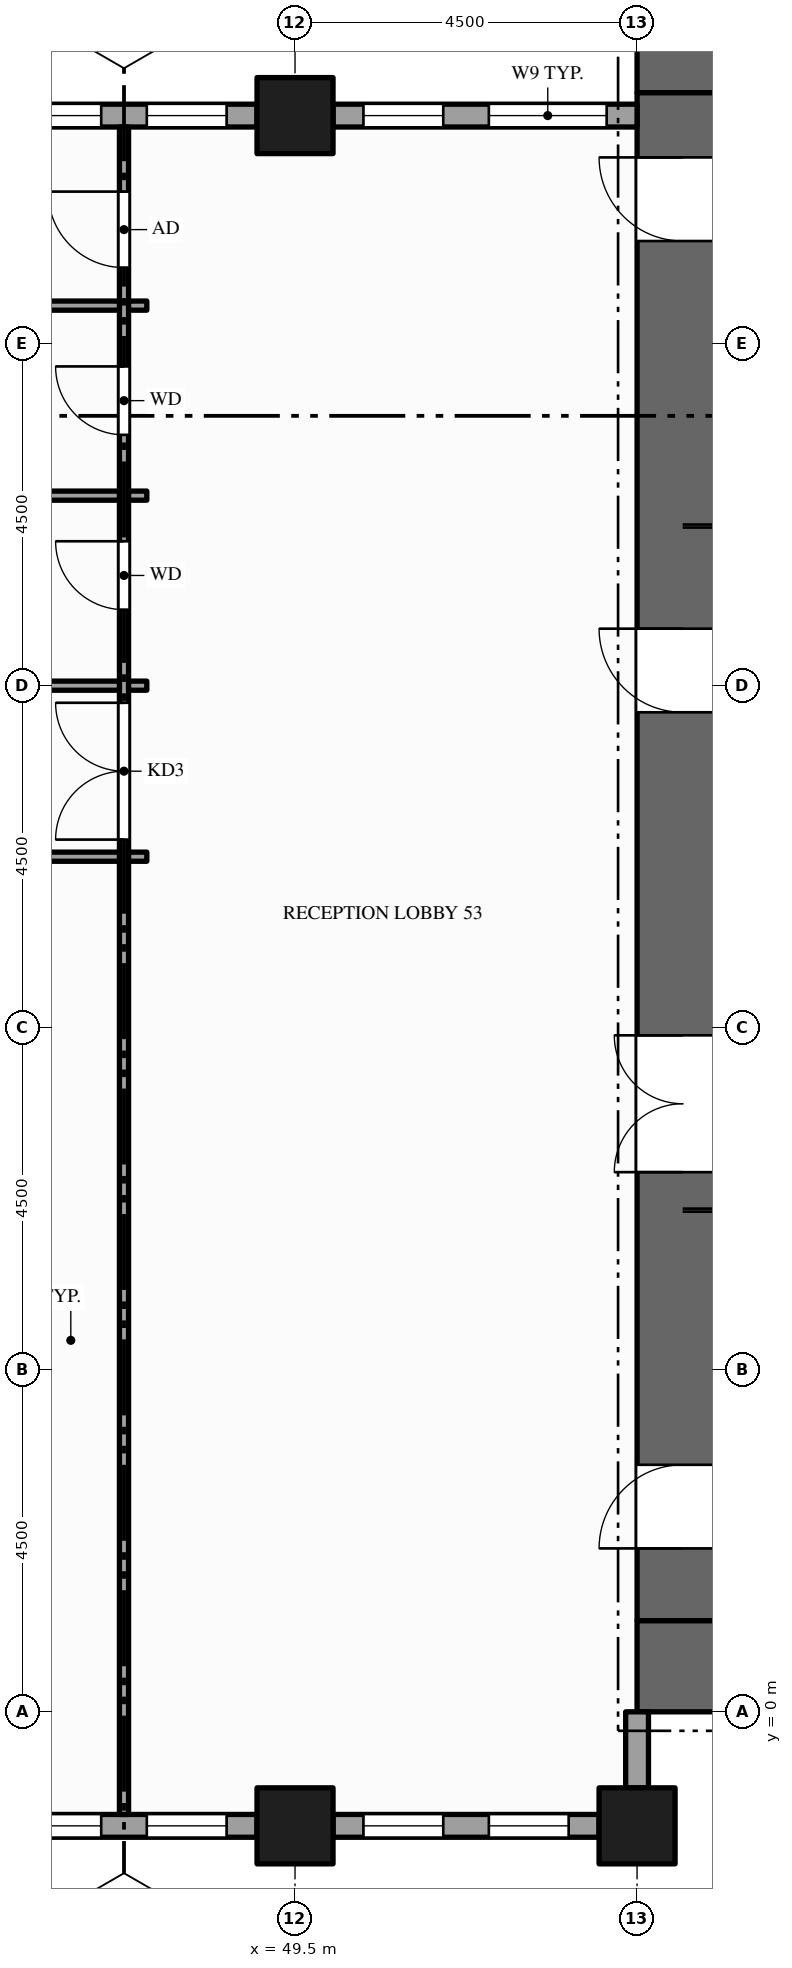
"""IFC4 building model, lengths in metres.
Left out: names, types, materials, properties, quantities, classifications, styles, units other than length and angle.
Written with IfcOpenShell. Run it as: python <this file> out.ifc"""

import sys

from ifc_helpers import new_model, si_unit, direction, frame, frame_2d, origin, origin_2d, place, context, subcontext, project, spatial, rectangle, hollow_rectangle, extrude, element, fill, save


model = new_model("IFC4")
c1 = context("Model", 3, precision=1e-05, world=origin(), true_north=direction((0.0, 1.0)))
c2 = subcontext(c1, "Body", "Model", "MODEL_VIEW")
j1 = project(units=[si_unit("LENGTHUNIT", "METRE"), si_unit("PLANEANGLEUNIT", "RADIAN")], contexts=[c1])
p1 = place(None, origin())
s1 = spatial("IfcSite", under=j1, at=p1, CompositionType="ELEMENT")
p2 = place(p1, origin())
s2 = spatial("IfcBuilding", under=s1, at=p2, CompositionType="ELEMENT")
p3 = place(p2, frame((0.0, 0.0, 123.0)))
s3 = spatial("IfcBuildingStorey", under=s2, at=p3, CompositionType="ELEMENT", Elevation=123.0)
for number, where, z_axis, x_axis in (
    (1, (67.5, 0.6, -0.15), (0.0, 0.0, 1.0), (-1.0, 0.0, 0.0)),
    (2, (54.0, 21.9, -0.15), (0.0, 0.0, 1.0), (1.0, 0.0, 0.0)),
):
    element("IfcWall", number, at=place(p3, frame(where, z_axis=z_axis, x_axis=x_axis)), inside=s3, PredefinedType="SHEAR", context=c2, shape_type="SweptSolid", body=[
        extrude(rectangle(XDim=13.5, YDim=1.2, at=frame_2d((6.75, 0.0))), origin(), (0.0, 0.0, 1.0), 4.0),
    ])
p4 = place(p3, frame((54.6, 1.2, -0.15), z_axis=(0.0, 0.0, 1.0), x_axis=(0.0, 1.0, 0.0)))
e3 = element("IfcWall", 3, at=p4, inside=s3, PredefinedType="SHEAR", context=c2, shape_type="SweptSolid", body=[
    extrude(rectangle(XDim=20.1, YDim=1.2, at=frame_2d((10.05, 0.0))), origin(), (0.0, 0.0, 1.0), 4.0),
])
p5 = place(p4, frame((5.9, 0.0, 0.15)))
e4 = element("IfcOpeningElement", 4, at=p5, cuts=e3, PredefinedType="OPENING", context=c2, shape_type="SweptSolid", body=[
    extrude(rectangle(XDim=1.8, YDim=2.1, at=frame_2d((0.9, 1.05))), frame((0.0, 0.61, 0.0), z_axis=(0.0, -1.0, 0.0), x_axis=(1.0, 0.0, 0.0)), (0.0, 0.0, 1.0), 1.22),
])
p6 = place(p4, frame((11.95, 0.0, 0.15)))
e5 = element("IfcOpeningElement", 5, at=p6, cuts=e3, PredefinedType="OPENING", context=c2, shape_type="SweptSolid", body=[
    extrude(rectangle(XDim=1.1, YDim=2.1, at=frame_2d((0.55, 1.05))), frame((0.0, 0.61, 0.0), z_axis=(0.0, -1.0, 0.0), x_axis=(1.0, 0.0, 0.0)), (0.0, 0.0, 1.0), 1.22),
])
p7 = place(p4, frame((0.95, 0.0, 0.15)))
e6 = element("IfcOpeningElement", 6, at=p7, cuts=e3, PredefinedType="OPENING", context=c2, shape_type="SweptSolid", body=[
    extrude(rectangle(XDim=1.1, YDim=2.1, at=frame_2d((0.55, 1.05))), frame((0.0, 0.61, 0.0), z_axis=(0.0, -1.0, 0.0), x_axis=(1.0, 0.0, 0.0)), (0.0, 0.0, 1.0), 1.22),
])
p8 = place(p4, frame((18.15, 0.0, 0.15)))
e7 = element("IfcOpeningElement", 7, at=p8, cuts=e3, PredefinedType="OPENING", context=c2, shape_type="SweptSolid", body=[
    extrude(rectangle(XDim=1.1, YDim=2.1, at=frame_2d((0.55, 1.05))), frame((0.0, 0.61, 0.0), z_axis=(0.0, -1.0, 0.0), x_axis=(1.0, 0.0, 0.0)), (0.0, 0.0, 1.0), 1.22),
])
for number, where, z_axis, x_axis in (
    (8, (49.5, -1.5, -0.15), (0.0, 0.0, 1.0), (1.0, 0.0, 0.0)),
    (9, (49.5, 21.0, -0.15), (0.0, 0.0, 1.0), (1.0, 0.0, 0.0)),
    (10, (54.0, -1.5, -0.15), (0.0, 0.0, 1.0), (1.0, 0.0, 0.0)),
):
    element("IfcColumn", number, at=place(p3, frame(where, z_axis=z_axis, x_axis=x_axis)), inside=s3, PredefinedType="COLUMN", context=c2, shape_type="SweptSolid", body=[
        extrude(hollow_rectangle(XDim=1.0, YDim=1.0, WallThickness=0.05, at=origin_2d()), origin(), (0.0, 0.0, 1.0), 4.0),
    ])
p9 = place(p3, frame((45.5, -1.5, 0.0), z_axis=(0.0, 0.0, 1.0), x_axis=(1.0, 0.0, 0.0)))
e11 = element("IfcWall", 11, at=p9, inside=s3, PredefinedType="STANDARD", context=c2, shape_type="SweptSolid", body=[
    extrude(rectangle(XDim=3.5, YDim=0.3, at=frame_2d((1.75, 0.0))), origin(), (0.0, 0.0, 1.0), 3.154),
])
p10 = place(p9, frame((0.4, 0.0, 0.9)))
e12 = element("IfcOpeningElement", 12, at=p10, cuts=e11, PredefinedType="OPENING", context=c2, shape_type="SweptSolid", body=[
    extrude(rectangle(XDim=1.05, YDim=2.0, at=frame_2d((0.525, 1.0))), frame((0.0, 0.16, 0.0), z_axis=(0.0, -1.0, 0.0), x_axis=(1.0, 0.0, 0.0)), (0.0, 0.0, 1.0), 0.32),
])
p11 = place(p9, frame((2.05, 0.0, 0.9)))
e13 = element("IfcOpeningElement", 13, at=p11, cuts=e11, PredefinedType="OPENING", context=c2, shape_type="SweptSolid", body=[
    extrude(rectangle(XDim=1.05, YDim=2.0, at=frame_2d((0.525, 1.0))), frame((0.0, 0.16, 0.0), z_axis=(0.0, -1.0, 0.0), x_axis=(1.0, 0.0, 0.0)), (0.0, 0.0, 1.0), 0.32),
])
p12 = place(p3, frame((50.0, -1.5, 0.0), z_axis=(0.0, 0.0, 1.0), x_axis=(1.0, 0.0, 0.0)))
e14 = element("IfcWall", 14, at=p12, inside=s3, PredefinedType="STANDARD", context=c2, shape_type="SweptSolid", body=[
    extrude(rectangle(XDim=3.5, YDim=0.3, at=frame_2d((1.75, 0.0))), origin(), (0.0, 0.0, 1.0), 3.154),
])
p13 = place(p12, frame((0.4, 0.0, 0.9)))
e15 = element("IfcOpeningElement", 15, at=p13, cuts=e14, PredefinedType="OPENING", context=c2, shape_type="SweptSolid", body=[
    extrude(rectangle(XDim=1.05, YDim=2.0, at=frame_2d((0.525, 1.0))), frame((0.0, 0.16, 0.0), z_axis=(0.0, -1.0, 0.0), x_axis=(1.0, 0.0, 0.0)), (0.0, 0.0, 1.0), 0.32),
])
p14 = place(p12, frame((2.05, 0.0, 0.9)))
e16 = element("IfcOpeningElement", 16, at=p14, cuts=e14, PredefinedType="OPENING", context=c2, shape_type="SweptSolid", body=[
    extrude(rectangle(XDim=1.05, YDim=2.0, at=frame_2d((0.525, 1.0))), frame((0.0, 0.16, 0.0), z_axis=(0.0, -1.0, 0.0), x_axis=(1.0, 0.0, 0.0)), (0.0, 0.0, 1.0), 0.32),
])
p15 = place(p3, frame((54.0, -1.0, 0.0), z_axis=(0.0, 0.0, 1.0), x_axis=(0.0, 1.0, 0.0)))
e17 = element("IfcWall", 17, at=p15, inside=s3, PredefinedType="STANDARD", context=c2, shape_type="SweptSolid", body=[
    extrude(rectangle(XDim=1.0, YDim=0.3, at=frame_2d((0.5, 0.0))), origin(), (0.0, 0.0, 1.0), 3.154),
])
p16 = place(p3, frame((54.0, 21.0, 0.0), z_axis=(0.0, 0.0, 1.0), x_axis=(-1.0, 0.0, 0.0)))
e18 = element("IfcWall", 18, at=p16, inside=s3, PredefinedType="STANDARD", context=c2, shape_type="SweptSolid", body=[
    extrude(rectangle(XDim=4.0, YDim=0.3, at=frame_2d((2.0, 0.0))), origin(), (0.0, 0.0, 1.0), 3.154),
])
p17 = place(p16, frame((0.4, 0.0, 0.9)))
e19 = element("IfcOpeningElement", 19, at=p17, cuts=e18, PredefinedType="OPENING", context=c2, shape_type="SweptSolid", body=[
    extrude(rectangle(XDim=1.55, YDim=2.0, at=frame_2d((0.775, 1.0))), frame((0.0, 0.16, 0.0), z_axis=(0.0, -1.0, 0.0), x_axis=(1.0, 0.0, 0.0)), (0.0, 0.0, 1.0), 0.32),
])
p18 = place(p16, frame((2.55, 0.0, 0.9)))
e20 = element("IfcOpeningElement", 20, at=p18, cuts=e18, PredefinedType="OPENING", context=c2, shape_type="SweptSolid", body=[
    extrude(rectangle(XDim=1.05, YDim=2.0, at=frame_2d((0.525, 1.0))), frame((0.0, 0.16, 0.0), z_axis=(0.0, -1.0, 0.0), x_axis=(1.0, 0.0, 0.0)), (0.0, 0.0, 1.0), 0.32),
])
p19 = place(p3, frame((49.0, 21.0, 0.0), z_axis=(0.0, 0.0, 1.0), x_axis=(-1.0, 0.0, 0.0)))
e21 = element("IfcWall", 21, at=p19, inside=s3, PredefinedType="STANDARD", context=c2, shape_type="SweptSolid", body=[
    extrude(rectangle(XDim=3.5, YDim=0.3, at=frame_2d((1.75, 0.0))), origin(), (0.0, 0.0, 1.0), 3.154),
])
p20 = place(p19, frame((0.4, 0.0, 0.9)))
e22 = element("IfcOpeningElement", 22, at=p20, cuts=e21, PredefinedType="OPENING", context=c2, shape_type="SweptSolid", body=[
    extrude(rectangle(XDim=1.05, YDim=2.0, at=frame_2d((0.525, 1.0))), frame((0.0, 0.16, 0.0), z_axis=(0.0, -1.0, 0.0), x_axis=(1.0, 0.0, 0.0)), (0.0, 0.0, 1.0), 0.32),
])
p21 = place(p19, frame((2.05, 0.0, 0.9)))
e23 = element("IfcOpeningElement", 23, at=p21, cuts=e21, PredefinedType="OPENING", context=c2, shape_type="SweptSolid", body=[
    extrude(rectangle(XDim=1.05, YDim=2.0, at=frame_2d((0.525, 1.0))), frame((0.0, 0.16, 0.0), z_axis=(0.0, -1.0, 0.0), x_axis=(1.0, 0.0, 0.0)), (0.0, 0.0, 1.0), 0.32),
])
p22 = place(p3, frame((47.25, -1.35, 0.0), z_axis=(0.0, 0.0, 1.0), x_axis=(0.0, 1.0, 0.0)))
e24 = element("IfcWall", 24, at=p22, inside=s3, PredefinedType="PARTITIONING", context=c2, shape_type="SweptSolid", body=[
    extrude(rectangle(XDim=22.2, YDim=0.12, at=frame_2d((11.1, 0.0))), origin(), (0.0, 0.0, 1.0), 2.938),
])
p23 = place(p22, frame((12.825, 0.0, 0.0)))
e25 = element("IfcOpeningElement", 25, at=p23, cuts=e24, PredefinedType="OPENING", context=c2, shape_type="SweptSolid", body=[
    extrude(rectangle(XDim=1.8, YDim=2.1, at=frame_2d((0.9, 1.05))), frame((0.0, 0.07, 0.0), z_axis=(0.0, -1.0, 0.0), x_axis=(1.0, 0.0, 0.0)), (0.0, 0.0, 1.0), 0.14),
])
p24 = place(p22, frame((15.85, 0.0, 0.0)))
e26 = element("IfcOpeningElement", 26, at=p24, cuts=e24, PredefinedType="OPENING", context=c2, shape_type="SweptSolid", body=[
    extrude(rectangle(XDim=0.9, YDim=2.1, at=frame_2d((0.45, 1.05))), frame((0.0, 0.07, 0.0), z_axis=(0.0, -1.0, 0.0), x_axis=(1.0, 0.0, 0.0)), (0.0, 0.0, 1.0), 0.14),
])
p25 = place(p22, frame((18.15, 0.0, 0.0)))
e27 = element("IfcOpeningElement", 27, at=p25, cuts=e24, PredefinedType="OPENING", context=c2, shape_type="SweptSolid", body=[
    extrude(rectangle(XDim=0.9, YDim=2.1, at=frame_2d((0.45, 1.05))), frame((0.0, 0.07, 0.0), z_axis=(0.0, -1.0, 0.0), x_axis=(1.0, 0.0, 0.0)), (0.0, 0.0, 1.0), 0.14),
])
p26 = place(p22, frame((20.35, 0.0, 0.0)))
e28 = element("IfcOpeningElement", 28, at=p26, cuts=e24, PredefinedType="OPENING", context=c2, shape_type="SweptSolid", body=[
    extrude(rectangle(XDim=1.0, YDim=2.1, at=frame_2d((0.5, 1.05))), frame((0.0, 0.07, 0.0), z_axis=(0.0, -1.0, 0.0), x_axis=(1.0, 0.0, 0.0)), (0.0, 0.0, 1.0), 0.14),
])
p27 = place(p3, frame((42.81, 11.25, 0.0), z_axis=(0.0, 0.0, 1.0), x_axis=(1.0, 0.0, 0.0)))
e29 = element("IfcWall", 29, at=p27, inside=s3, PredefinedType="PARTITIONING", context=c2, shape_type="SweptSolid", body=[
    extrude(rectangle(XDim=4.38, YDim=0.12, at=frame_2d((2.19, 0.0))), origin(), (0.0, 0.0, 1.0), 2.938),
])
p28 = place(p27, frame((1.69, 0.0, 0.0)))
e30 = element("IfcOpeningElement", 30, at=p28, cuts=e29, PredefinedType="OPENING", context=c2, shape_type="SweptSolid", body=[
    extrude(rectangle(XDim=1.0, YDim=2.1, at=frame_2d((0.5, 1.05))), frame((0.0, 0.07, 0.0), z_axis=(0.0, -1.0, 0.0), x_axis=(1.0, 0.0, 0.0)), (0.0, 0.0, 1.0), 0.14),
])
p29 = place(p3, frame((47.31, 11.25, 0.0), z_axis=(0.0, 0.0, 1.0), x_axis=(1.0, 0.0, 0.0)))
e31 = element("IfcWall", 31, at=p29, inside=s3, PredefinedType="PARTITIONING", context=c2, shape_type="SweptSolid", body=[
    extrude(rectangle(XDim=0.24, YDim=0.12, at=frame_2d((0.12, 0.0))), origin(), (0.0, 0.0, 1.0), 2.938),
])
p30 = place(p3, frame((42.81, 13.5, 0.0), z_axis=(0.0, 0.0, 1.0), x_axis=(1.0, 0.0, 0.0)))
e32 = element("IfcWall", 32, at=p30, inside=s3, PredefinedType="PARTITIONING", context=c2, shape_type="SweptSolid", body=[
    extrude(rectangle(XDim=4.38, YDim=0.12, at=frame_2d((2.19, 0.0))), origin(), (0.0, 0.0, 1.0), 2.938),
])
p31 = place(p3, frame((47.31, 13.5, 0.0), z_axis=(0.0, 0.0, 1.0), x_axis=(1.0, 0.0, 0.0)))
e33 = element("IfcWall", 33, at=p31, inside=s3, PredefinedType="PARTITIONING", context=c2, shape_type="SweptSolid", body=[
    extrude(rectangle(XDim=0.24, YDim=0.12, at=frame_2d((0.12, 0.0))), origin(), (0.0, 0.0, 1.0), 2.938),
])
p32 = place(p3, frame((42.81, 16.0, 0.0), z_axis=(0.0, 0.0, 1.0), x_axis=(1.0, 0.0, 0.0)))
e34 = element("IfcWall", 34, at=p32, inside=s3, PredefinedType="PARTITIONING", context=c2, shape_type="SweptSolid", body=[
    extrude(rectangle(XDim=4.38, YDim=0.12, at=frame_2d((2.19, 0.0))), origin(), (0.0, 0.0, 1.0), 2.938),
])
p33 = place(p3, frame((47.31, 16.0, 0.0), z_axis=(0.0, 0.0, 1.0), x_axis=(1.0, 0.0, 0.0)))
e35 = element("IfcWall", 35, at=p33, inside=s3, PredefinedType="PARTITIONING", context=c2, shape_type="SweptSolid", body=[
    extrude(rectangle(XDim=0.24, YDim=0.12, at=frame_2d((0.12, 0.0))), origin(), (0.0, 0.0, 1.0), 2.938),
])
p34 = place(p3, frame((42.81, 18.5, 0.0), z_axis=(0.0, 0.0, 1.0), x_axis=(1.0, 0.0, 0.0)))
e36 = element("IfcWall", 36, at=p34, inside=s3, PredefinedType="PARTITIONING", context=c2, shape_type="SweptSolid", body=[
    extrude(rectangle(XDim=4.38, YDim=0.12, at=frame_2d((2.19, 0.0))), origin(), (0.0, 0.0, 1.0), 2.938),
])
p35 = place(p3, frame((47.31, 18.5, 0.0), z_axis=(0.0, 0.0, 1.0), x_axis=(1.0, 0.0, 0.0)))
e37 = element("IfcWall", 37, at=p35, inside=s3, PredefinedType="PARTITIONING", context=c2, shape_type="SweptSolid", body=[
    extrude(rectangle(XDim=0.24, YDim=0.12, at=frame_2d((0.12, 0.0))), origin(), (0.0, 0.0, 1.0), 2.938),
])
p36 = place(p10, origin())
e38 = element("IfcWindow", 38, at=p36, inside=s3, PartitioningType="SINGLE_PANEL", PredefinedType="WINDOW", context=c2, shape_type="SweptSolid", body=[
    extrude(rectangle(XDim=1.05, YDim=2.0, at=frame_2d((0.525, 1.0))), frame((0.0, 0.03, 0.0), z_axis=(0.0, -1.0, 0.0), x_axis=(1.0, 0.0, 0.0)), (0.0, 0.0, 1.0), 0.06),
])
fill(e12, e38)
p37 = place(p11, origin())
e39 = element("IfcWindow", 39, at=p37, inside=s3, PartitioningType="SINGLE_PANEL", PredefinedType="WINDOW", context=c2, shape_type="SweptSolid", body=[
    extrude(rectangle(XDim=1.05, YDim=2.0, at=frame_2d((0.525, 1.0))), frame((0.0, 0.03, 0.0), z_axis=(0.0, -1.0, 0.0), x_axis=(1.0, 0.0, 0.0)), (0.0, 0.0, 1.0), 0.06),
])
fill(e13, e39)
p38 = place(p13, origin())
e40 = element("IfcWindow", 40, at=p38, inside=s3, PartitioningType="SINGLE_PANEL", PredefinedType="WINDOW", context=c2, shape_type="SweptSolid", body=[
    extrude(rectangle(XDim=1.05, YDim=2.0, at=frame_2d((0.525, 1.0))), frame((0.0, 0.03, 0.0), z_axis=(0.0, -1.0, 0.0), x_axis=(1.0, 0.0, 0.0)), (0.0, 0.0, 1.0), 0.06),
])
fill(e15, e40)
p39 = place(p14, origin())
e41 = element("IfcWindow", 41, at=p39, inside=s3, PartitioningType="SINGLE_PANEL", PredefinedType="WINDOW", context=c2, shape_type="SweptSolid", body=[
    extrude(rectangle(XDim=1.05, YDim=2.0, at=frame_2d((0.525, 1.0))), frame((0.0, 0.03, 0.0), z_axis=(0.0, -1.0, 0.0), x_axis=(1.0, 0.0, 0.0)), (0.0, 0.0, 1.0), 0.06),
])
fill(e16, e41)
p40 = place(p17, origin())
e42 = element("IfcWindow", 42, at=p40, inside=s3, PartitioningType="SINGLE_PANEL", PredefinedType="WINDOW", context=c2, shape_type="SweptSolid", body=[
    extrude(rectangle(XDim=1.55, YDim=2.0, at=frame_2d((0.775, 1.0))), frame((0.0, 0.03, 0.0), z_axis=(0.0, -1.0, 0.0), x_axis=(1.0, 0.0, 0.0)), (0.0, 0.0, 1.0), 0.06),
])
fill(e19, e42)
p41 = place(p18, origin())
e43 = element("IfcWindow", 43, at=p41, inside=s3, PartitioningType="SINGLE_PANEL", PredefinedType="WINDOW", context=c2, shape_type="SweptSolid", body=[
    extrude(rectangle(XDim=1.05, YDim=2.0, at=frame_2d((0.525, 1.0))), frame((0.0, 0.03, 0.0), z_axis=(0.0, -1.0, 0.0), x_axis=(1.0, 0.0, 0.0)), (0.0, 0.0, 1.0), 0.06),
])
fill(e20, e43)
p42 = place(p20, origin())
e44 = element("IfcWindow", 44, at=p42, inside=s3, PartitioningType="SINGLE_PANEL", PredefinedType="WINDOW", context=c2, shape_type="SweptSolid", body=[
    extrude(rectangle(XDim=1.05, YDim=2.0, at=frame_2d((0.525, 1.0))), frame((0.0, 0.03, 0.0), z_axis=(0.0, -1.0, 0.0), x_axis=(1.0, 0.0, 0.0)), (0.0, 0.0, 1.0), 0.06),
])
fill(e22, e44)
p43 = place(p21, origin())
e45 = element("IfcWindow", 45, at=p43, inside=s3, PartitioningType="SINGLE_PANEL", PredefinedType="WINDOW", context=c2, shape_type="SweptSolid", body=[
    extrude(rectangle(XDim=1.05, YDim=2.0, at=frame_2d((0.525, 1.0))), frame((0.0, 0.03, 0.0), z_axis=(0.0, -1.0, 0.0), x_axis=(1.0, 0.0, 0.0)), (0.0, 0.0, 1.0), 0.06),
])
fill(e23, e45)
p44 = place(p5, origin())
e46 = element("IfcDoor", 46, at=p44, inside=s3, OperationType="DOUBLE_DOOR_SINGLE_SWING", PredefinedType="DOOR", context=c2, shape_type="SweptSolid", body=[
    extrude(rectangle(XDim=1.8, YDim=2.1, at=frame_2d((0.9, 1.05))), frame((0.0, 0.025, 0.0), z_axis=(0.0, -1.0, 0.0), x_axis=(1.0, 0.0, 0.0)), (0.0, 0.0, 1.0), 0.05),
])
fill(e4, e46)
p45 = place(p6, origin())
e47 = element("IfcDoor", 47, at=p45, inside=s3, OperationType="SINGLE_SWING_RIGHT", PredefinedType="DOOR", context=c2, shape_type="SweptSolid", body=[
    extrude(rectangle(XDim=1.1, YDim=2.1, at=frame_2d((0.55, 1.05))), frame((0.0, 0.025, 0.0), z_axis=(0.0, -1.0, 0.0), x_axis=(1.0, 0.0, 0.0)), (0.0, 0.0, 1.0), 0.05),
])
fill(e5, e47)
p46 = place(p7, origin())
e48 = element("IfcDoor", 48, at=p46, inside=s3, OperationType="SINGLE_SWING_LEFT", PredefinedType="DOOR", context=c2, shape_type="SweptSolid", body=[
    extrude(rectangle(XDim=1.1, YDim=2.1, at=frame_2d((0.55, 1.05))), frame((0.0, 0.025, 0.0), z_axis=(0.0, -1.0, 0.0), x_axis=(1.0, 0.0, 0.0)), (0.0, 0.0, 1.0), 0.05),
])
fill(e6, e48)
p47 = place(p8, origin())
e49 = element("IfcDoor", 49, at=p47, inside=s3, OperationType="SINGLE_SWING_RIGHT", PredefinedType="DOOR", context=c2, shape_type="SweptSolid", body=[
    extrude(rectangle(XDim=1.1, YDim=2.1, at=frame_2d((0.55, 1.05))), frame((0.0, 0.025, 0.0), z_axis=(0.0, -1.0, 0.0), x_axis=(1.0, 0.0, 0.0)), (0.0, 0.0, 1.0), 0.05),
])
fill(e7, e49)
p48 = place(p23, origin())
e50 = element("IfcDoor", 50, at=p48, inside=s3, OperationType="DOUBLE_DOOR_SINGLE_SWING", PredefinedType="DOOR", context=c2, shape_type="SweptSolid", body=[
    extrude(rectangle(XDim=1.8, YDim=2.1, at=frame_2d((0.9, 1.05))), frame((0.0, 0.025, 0.0), z_axis=(0.0, -1.0, 0.0), x_axis=(1.0, 0.0, 0.0)), (0.0, 0.0, 1.0), 0.05),
])
fill(e25, e50)
p49 = place(p24, origin())
e51 = element("IfcDoor", 51, at=p49, inside=s3, OperationType="SINGLE_SWING_RIGHT", PredefinedType="DOOR", context=c2, shape_type="SweptSolid", body=[
    extrude(rectangle(XDim=0.9, YDim=2.1, at=frame_2d((0.45, 1.05))), frame((0.0, 0.025, 0.0), z_axis=(0.0, -1.0, 0.0), x_axis=(1.0, 0.0, 0.0)), (0.0, 0.0, 1.0), 0.05),
])
fill(e26, e51)
p50 = place(p25, origin())
e52 = element("IfcDoor", 52, at=p50, inside=s3, OperationType="SINGLE_SWING_RIGHT", PredefinedType="DOOR", context=c2, shape_type="SweptSolid", body=[
    extrude(rectangle(XDim=0.9, YDim=2.1, at=frame_2d((0.45, 1.05))), frame((0.0, 0.025, 0.0), z_axis=(0.0, -1.0, 0.0), x_axis=(1.0, 0.0, 0.0)), (0.0, 0.0, 1.0), 0.05),
])
fill(e27, e52)
p51 = place(p26, origin())
e53 = element("IfcDoor", 53, at=p51, inside=s3, OperationType="SINGLE_SWING_RIGHT", PredefinedType="DOOR", context=c2, shape_type="SweptSolid", body=[
    extrude(rectangle(XDim=1.0, YDim=2.1, at=frame_2d((0.5, 1.05))), frame((0.0, 0.025, 0.0), z_axis=(0.0, -1.0, 0.0), x_axis=(1.0, 0.0, 0.0)), (0.0, 0.0, 1.0), 0.05),
])
fill(e28, e53)
save(model, sys.argv[1])
